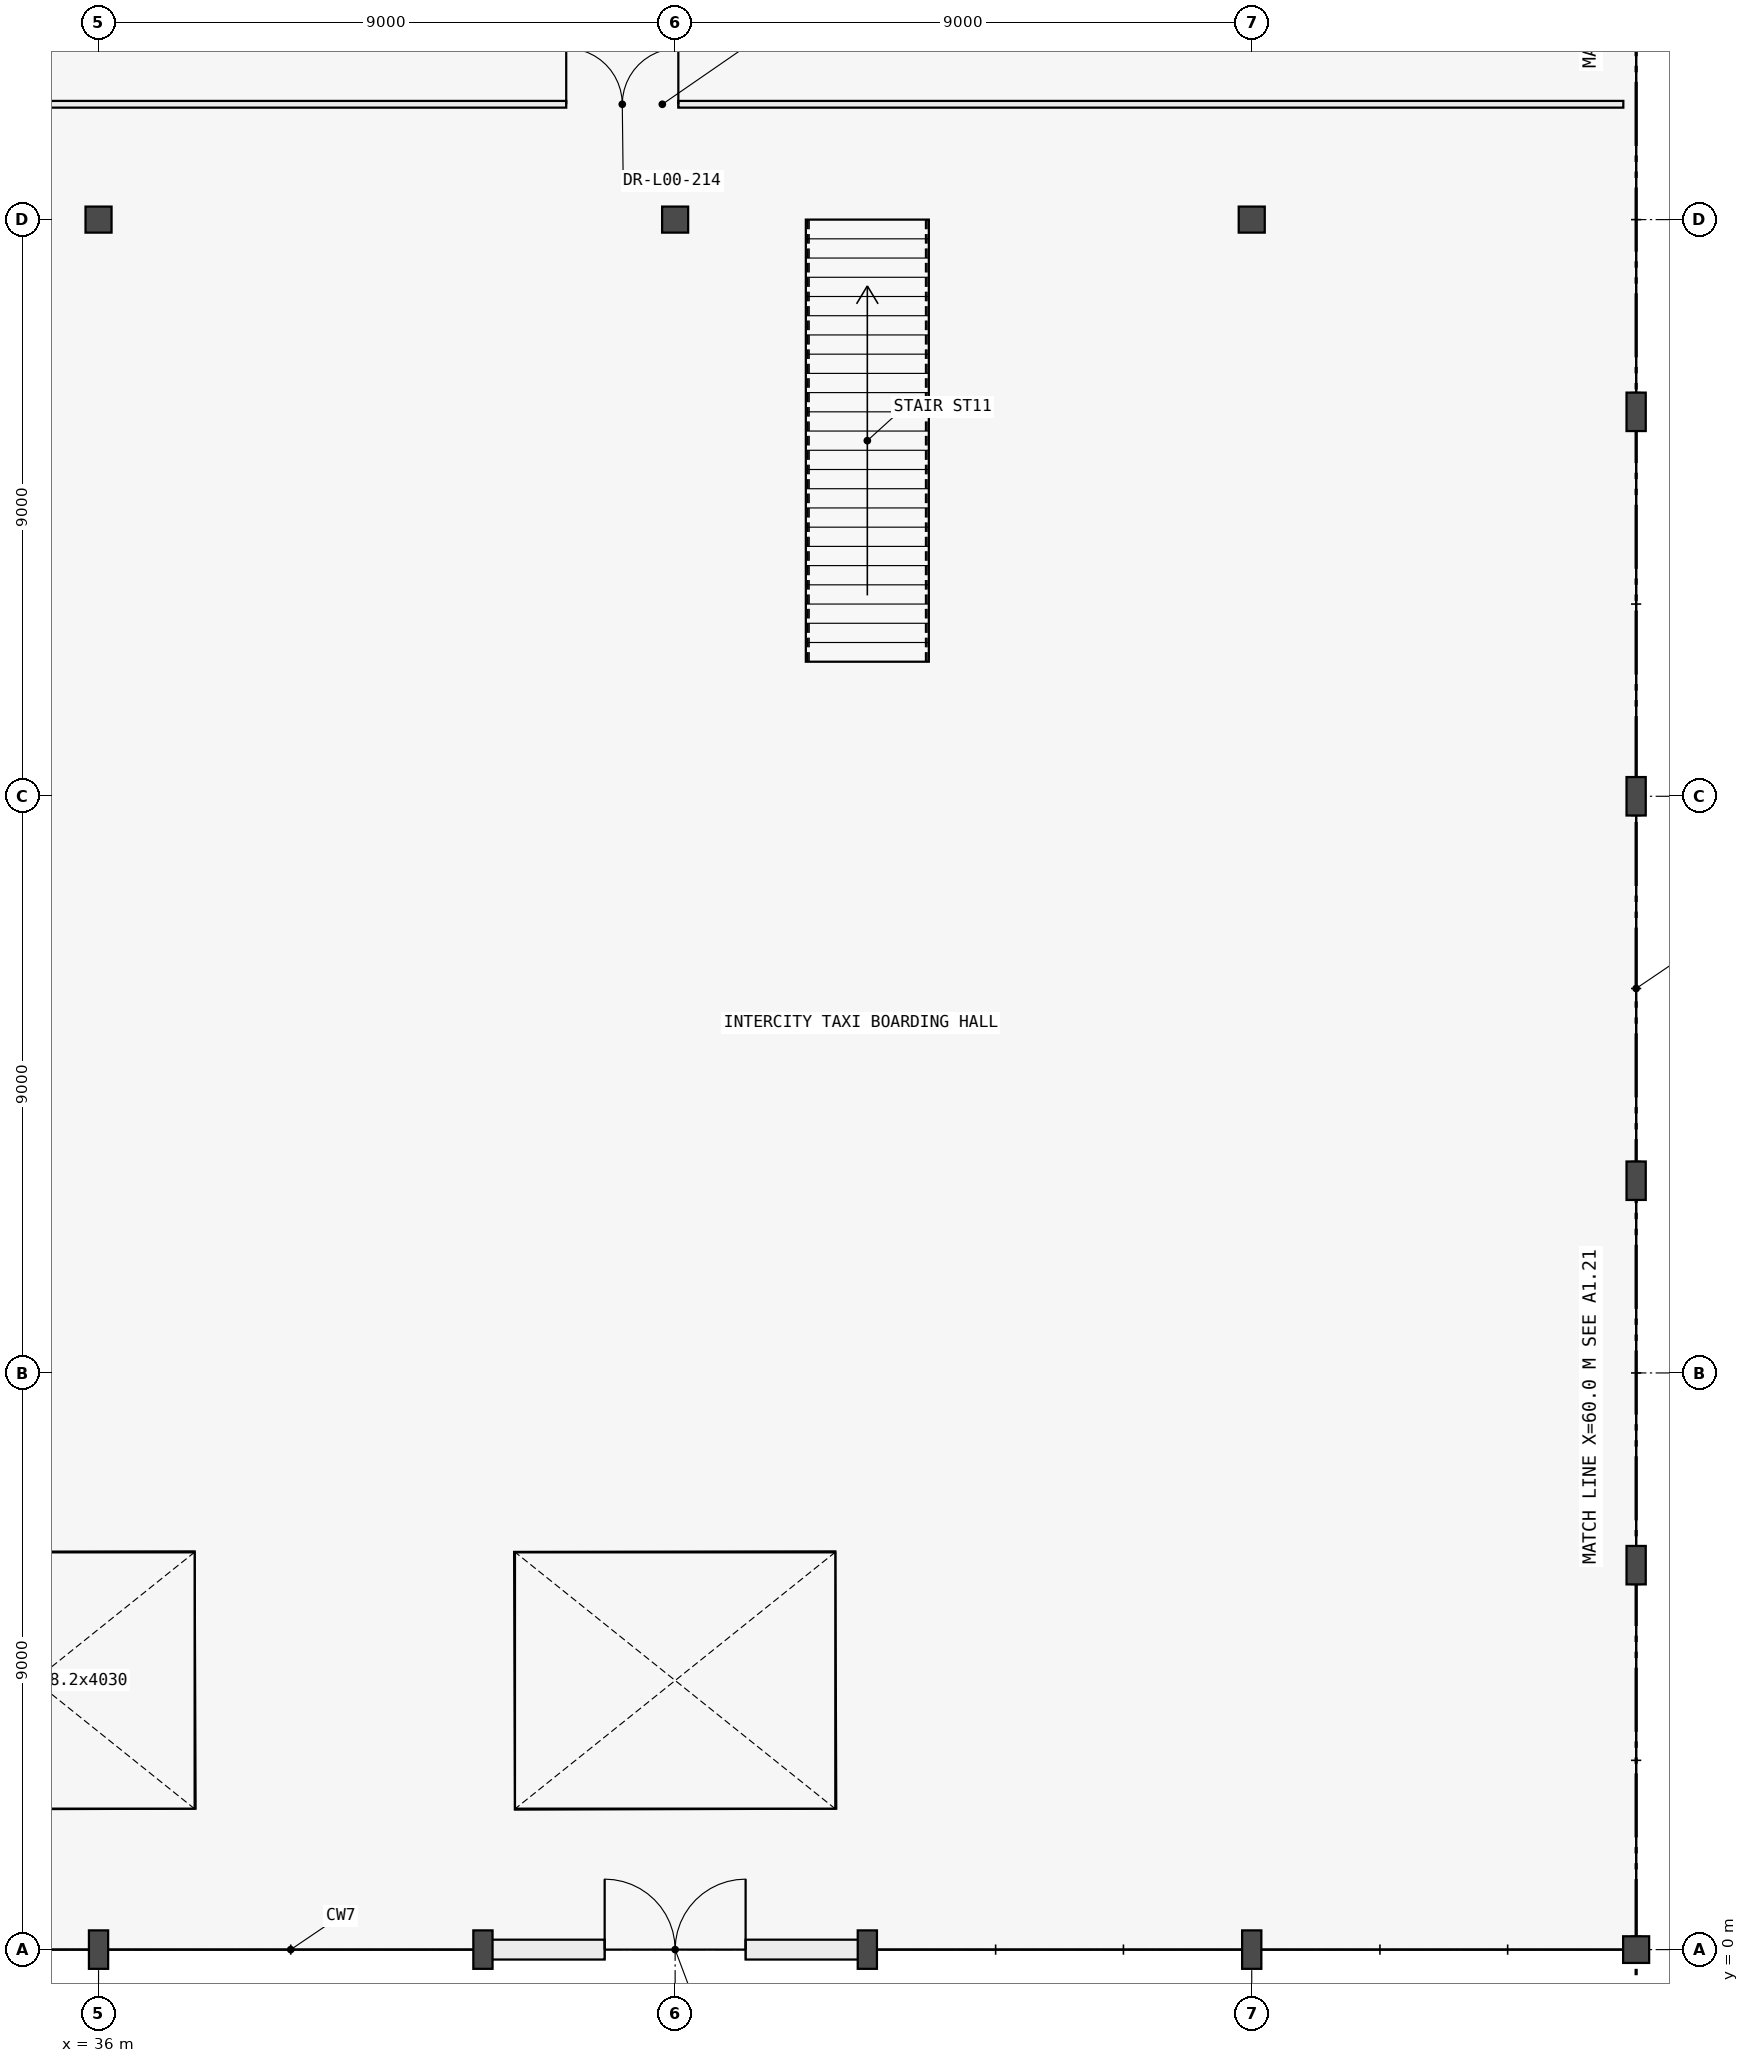
"""IFC4 building model, lengths in metres.
Left out: names, types, materials, properties, quantities, classifications, styles, units other than length and angle.
Written with IfcOpenShell. Run it as: python <this file> out.ifc"""

import sys

from ifc_helpers import new_model, si_unit, direction, frame, frame_2d, origin, origin_2d, place, context, subcontext, project, spatial, rectangle, hollow_circle, i_section, extrude, element, fill, save


model = new_model("IFC4")
c1 = context("Model", 3, precision=1e-05, world=origin(), true_north=direction((0.0, 1.0)))
c2 = subcontext(c1, "Body", "Model", "MODEL_VIEW")
j1 = project(units=[si_unit("LENGTHUNIT", "METRE"), si_unit("PLANEANGLEUNIT", "RADIAN")], contexts=[c1])
p1 = place(None, origin())
s1 = spatial("IfcSite", under=j1, at=p1, CompositionType="ELEMENT")
p2 = place(p1, origin())
s2 = spatial("IfcBuilding", under=s1, at=p2, CompositionType="ELEMENT")
p3 = place(p2, origin())
s3 = spatial("IfcBuildingStorey", under=s2, at=p3, CompositionType="ELEMENT", Elevation=0.0)
p4 = place(p3, frame((60.0, 0.0, 0.0), z_axis=(0.0, 0.0, 1.0), x_axis=(1.0, 0.0, 0.0)))
e1 = element("IfcColumn", 1, at=p4, inside=s3, PredefinedType="COLUMN", context=c2, shape_type="SweptSolid", body=[
    extrude(i_section(OverallWidth=0.406, OverallDepth=0.416, WebThickness=0.024, FlangeThickness=0.039, FilletRadius=0.015, at=origin_2d()), origin(), (0.0, 0.0, 1.0), 4.2),
])
for number, where, z_axis, x_axis in (
    (2, (36.0, 0.0, 0.0), (0.0, 0.0, 1.0), (1.0, 0.0, 0.0)),
    (3, (42.0, 0.0, 0.0), (0.0, 0.0, 1.0), (1.0, 0.0, 0.0)),
    (4, (48.0, 0.0, 0.0), (0.0, 0.0, 1.0), (1.0, 0.0, 0.0)),
    (5, (54.0, 0.0, 0.0), (0.0, 0.0, 1.0), (1.0, 0.0, 0.0)),
    (6, (60.0, 6.0, 0.0), (0.0, 0.0, 1.0), (1.0, 0.0, 0.0)),
    (7, (60.0, 12.0, 0.0), (0.0, 0.0, 1.0), (1.0, 0.0, 0.0)),
    (8, (60.0, 18.0, 0.0), (0.0, 0.0, 1.0), (1.0, 0.0, 0.0)),
    (9, (60.0, 24.0, 0.0), (0.0, 0.0, 1.0), (1.0, 0.0, 0.0)),
):
    element("IfcColumn", number, at=place(p3, frame(where, z_axis=z_axis, x_axis=x_axis)), inside=s3, PredefinedType="COLUMN", context=c2, shape_type="SweptSolid", body=[
        extrude(i_section(OverallWidth=0.3, OverallDepth=0.6, WebThickness=0.015, FlangeThickness=0.03, FilletRadius=0.027, at=origin_2d()), origin(), (0.0, 0.0, 1.0), 4.2),
    ])
for number, where, z_axis, x_axis in (
    (10, (36.0, 27.0, 0.0), (0.0, 0.0, 1.0), (1.0, 0.0, 0.0)),
    (11, (45.0, 27.0, 0.0), (0.0, 0.0, 1.0), (1.0, 0.0, 0.0)),
    (12, (54.0, 27.0, 0.0), (0.0, 0.0, 1.0), (1.0, 0.0, 0.0)),
):
    element("IfcColumn", number, at=place(p3, frame(where, z_axis=z_axis, x_axis=x_axis)), inside=s3, PredefinedType="COLUMN", context=c2, shape_type="SweptSolid", body=[
        extrude(hollow_circle(Radius=0.203, WallThickness=0.016, at=origin_2d()), origin(), (0.0, 0.0, 1.0), 4.2),
    ])
p5 = place(p3, frame((42.008, 0.0, 0.0), z_axis=(0.0, 0.0, 1.0), x_axis=(1.0, 0.0, 0.0)))
e13 = element("IfcWall", 13, at=p5, inside=s3, PredefinedType="STANDARD", context=c2, shape_type="SweptSolid", body=[
    extrude(rectangle(XDim=5.984, YDim=0.31, at=frame_2d((2.992, 0.0))), origin(), (0.0, 0.0, 1.0), 3.085),
])
p6 = place(p5, frame((1.892, 0.0, 0.0)))
e14 = element("IfcOpeningElement", 14, at=p6, cuts=e13, PredefinedType="OPENING", context=c2, shape_type="SweptSolid", body=[
    extrude(rectangle(XDim=2.2, YDim=2.4, at=frame_2d((1.1, 1.2))), frame((0.0, 0.165, 0.0), z_axis=(0.0, -1.0, 0.0), x_axis=(1.0, 0.0, 0.0)), (0.0, 0.0, 1.0), 0.33),
])
p7 = place(p3, frame((29.8, 28.8, 0.0), z_axis=(0.0, 0.0, 1.0), x_axis=(1.0, 0.0, 0.0)))
e15 = element("IfcWall", 15, at=p7, inside=s3, PredefinedType="MOVABLE", context=c2, shape_type="SweptSolid", body=[
    extrude(rectangle(XDim=30.0, YDim=0.105, at=frame_2d((15.0, 0.0))), origin(), (0.0, 0.0, 1.0), 3.95),
])
p8 = place(p7, frame((13.5, 0.0, 0.0)))
e16 = element("IfcOpeningElement", 16, at=p8, cuts=e15, PredefinedType="OPENING", context=c2, shape_type="SweptSolid", body=[
    extrude(rectangle(XDim=1.75, YDim=2.25, at=frame_2d((0.875, 1.125))), frame((0.0, 0.062, 0.0), z_axis=(0.0, -1.0, 0.0), x_axis=(1.0, 0.0, 0.0)), (0.0, 0.0, 1.0), 0.125),
])
p9 = place(p6, frame((2.2, 0.0, 0.0), z_axis=(0.0, 0.0, 1.0), x_axis=(-1.0, 0.0, 0.0)))
e17 = element("IfcDoor", 17, at=p9, inside=s3, OperationType="DOUBLE_DOOR_SINGLE_SWING", PredefinedType="DOOR", context=c2, shape_type="SweptSolid", body=[
    extrude(rectangle(XDim=2.2, YDim=2.4, at=frame_2d((1.1, 1.2))), frame((0.0, 0.025, 0.0), z_axis=(0.0, -1.0, 0.0), x_axis=(1.0, 0.0, 0.0)), (0.0, 0.0, 1.0), 0.05),
])
fill(e14, e17)
p10 = place(p8, origin())
e18 = element("IfcDoor", 18, at=p10, inside=s3, OperationType="DOUBLE_DOOR_SINGLE_SWING", PredefinedType="DOOR", context=c2, shape_type="SweptSolid", body=[
    extrude(rectangle(XDim=1.75, YDim=2.25, at=frame_2d((0.875, 1.125))), frame((0.0, 0.025, 0.0), z_axis=(0.0, -1.0, 0.0), x_axis=(1.0, 0.0, 0.0)), (0.0, 0.0, 1.0), 0.05),
])
fill(e16, e18)
save(model, sys.argv[1])
